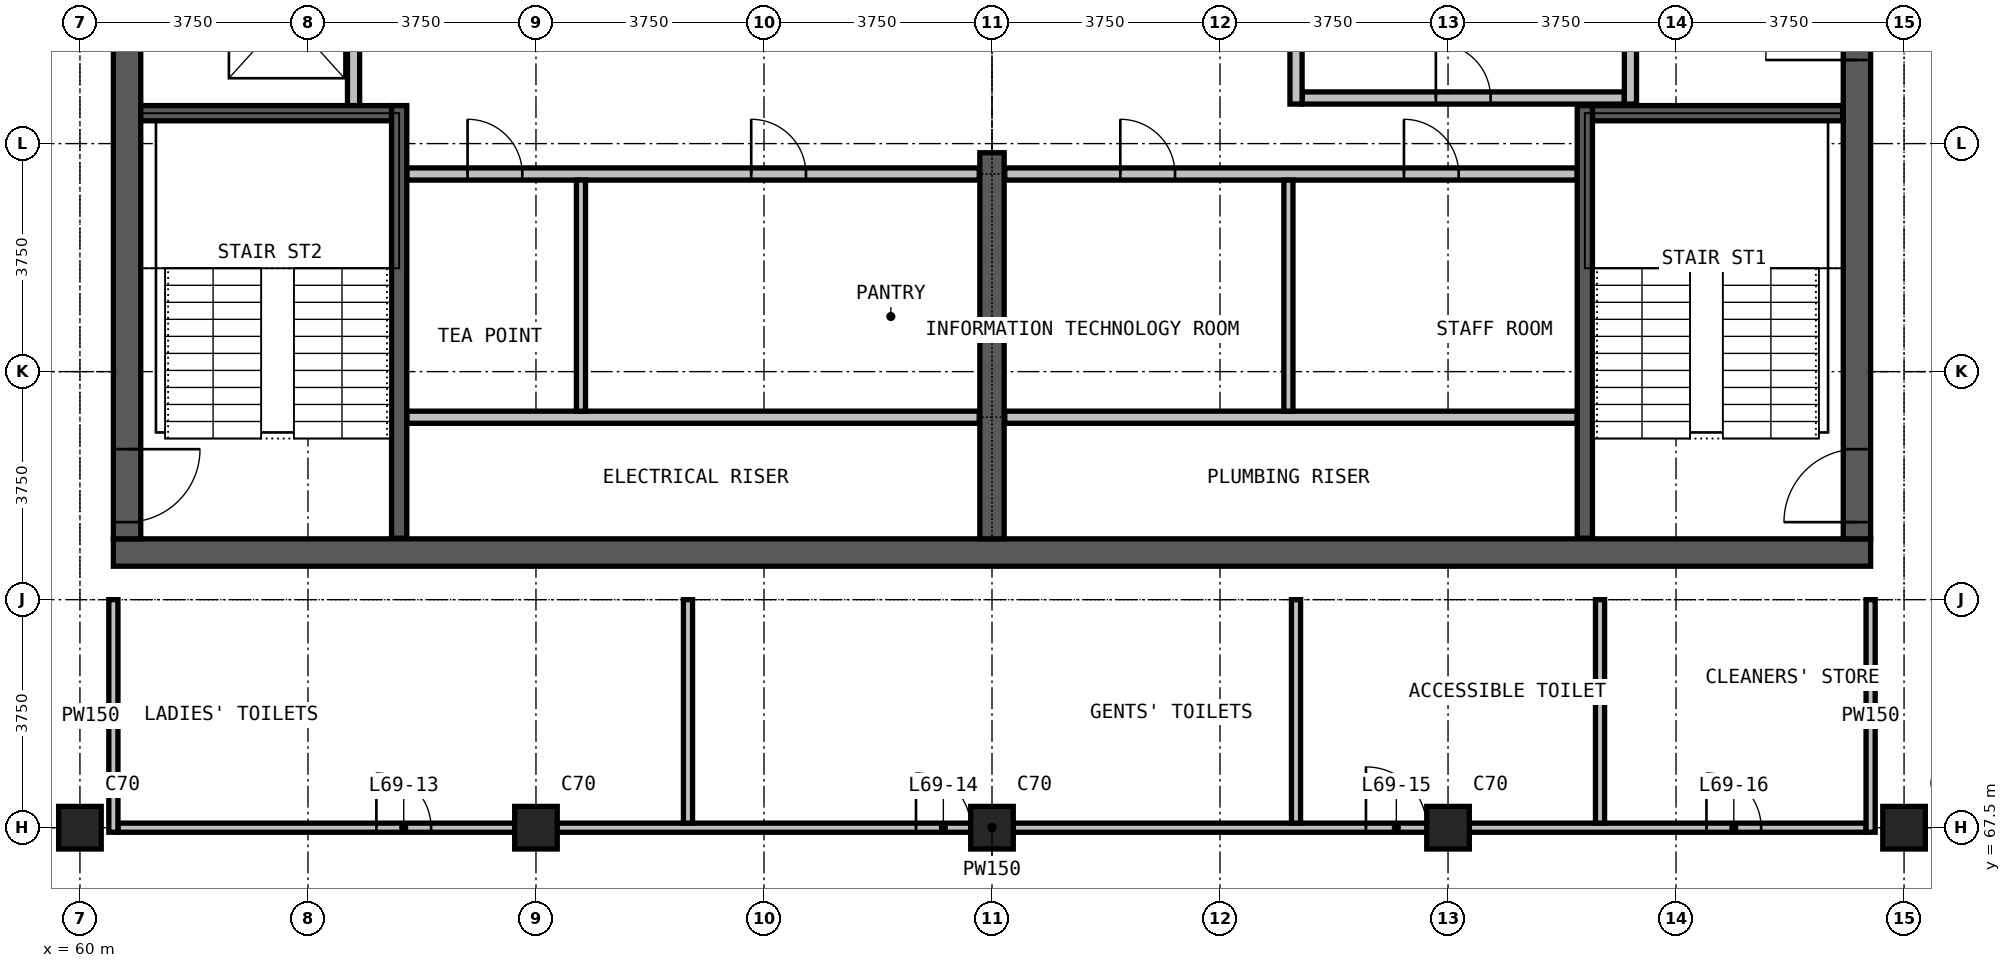
"""IFC4 building model, lengths in metres.
Left out: names, types, materials, properties, quantities, classifications, styles, units other than length and angle.
Written with IfcOpenShell. Run it as: python <this file> out.ifc"""

import sys

from ifc_helpers import new_model, si_unit, direction, frame, frame_2d, origin, origin_2d, place, context, subcontext, project, spatial, rectangle, extrude, element, fill, save


model = new_model("IFC4")
c1 = context("Model", 3, precision=1e-05, world=origin(), true_north=direction((0.0, 1.0)))
c2 = subcontext(c1, "Body", "Model", "MODEL_VIEW")
j1 = project(units=[si_unit("LENGTHUNIT", "METRE"), si_unit("PLANEANGLEUNIT", "RADIAN")], contexts=[c1])
p1 = place(None, origin())
s1 = spatial("IfcSite", under=j1, at=p1, CompositionType="ELEMENT")
p2 = place(p1, origin())
s2 = spatial("IfcBuilding", under=s1, at=p2, CompositionType="ELEMENT")
p3 = place(p2, frame((0.0, 0.0, 265.7)))
s3 = spatial("IfcBuildingStorey", under=s2, at=p3, CompositionType="ELEMENT", Elevation=265.7)
for number, where, z_axis, x_axis in (
    (1, (60.0, 67.5, 0.0), (0.0, 0.0, 1.0), (1.0, 0.0, 0.0)),
    (2, (67.5, 67.5, 0.0), (0.0, 0.0, 1.0), (1.0, 0.0, 0.0)),
    (3, (75.0, 67.5, 0.0), (0.0, 0.0, 1.0), (1.0, 0.0, 0.0)),
    (4, (82.5, 67.5, 0.0), (0.0, 0.0, 1.0), (1.0, 0.0, 0.0)),
    (5, (90.0, 67.5, 0.0), (0.0, 0.0, 1.0), (1.0, 0.0, 0.0)),
):
    element("IfcColumn", number, at=place(p3, frame(where, z_axis=z_axis, x_axis=x_axis)), inside=s3, PredefinedType="COLUMN", context=c2, shape_type="SweptSolid", body=[
        extrude(rectangle(XDim=0.7, YDim=0.7, at=origin_2d()), origin(), (0.0, 0.0, 1.0), 3.6),
    ])
p4 = place(p3, frame((60.55, 72.025, 0.0), z_axis=(0.0, 0.0, 1.0), x_axis=(1.0, 0.0, 0.0)))
e6 = element("IfcWall", 6, at=p4, inside=s3, PredefinedType="SHEAR", context=c2, shape_type="SweptSolid", body=[
    extrude(rectangle(XDim=28.9, YDim=0.45, at=frame_2d((14.45, 0.0))), origin(), (0.0, 0.0, 1.0), 3.6),
])
p5 = place(p3, frame((89.225, 72.25, 0.0), z_axis=(0.0, 0.0, 1.0), x_axis=(0.0, 1.0, 0.0)))
e7 = element("IfcWall", 7, at=p5, inside=s3, PredefinedType="SHEAR", context=c2, shape_type="SweptSolid", body=[
    extrude(rectangle(XDim=20.5, YDim=0.45, at=frame_2d((10.25, 0.0))), origin(), (0.0, 0.0, 1.0), 3.6),
])
p6 = place(p5, frame((0.275, 0.0, 0.0)))
e8 = element("IfcOpeningElement", 8, at=p6, cuts=e7, PredefinedType="OPENING", context=c2, shape_type="SweptSolid", body=[
    extrude(rectangle(XDim=1.2, YDim=2.2, at=frame_2d((0.6, 1.1))), frame((0.0, 0.235, 0.0), z_axis=(0.0, -1.0, 0.0), x_axis=(1.0, 0.0, 0.0)), (0.0, 0.0, 1.0), 0.47),
])
p7 = place(p5, frame((13.775, 0.0, 0.0)))
e9 = element("IfcOpeningElement", 9, at=p7, cuts=e7, PredefinedType="OPENING", context=c2, shape_type="SweptSolid", body=[
    extrude(rectangle(XDim=1.2, YDim=2.2, at=frame_2d((0.6, 1.1))), frame((0.0, 0.235, 0.0), z_axis=(0.0, -1.0, 0.0), x_axis=(1.0, 0.0, 0.0)), (0.0, 0.0, 1.0), 0.47),
])
p8 = place(p5, frame((7.875, 0.0, 0.0)))
e10 = element("IfcOpeningElement", 10, at=p8, cuts=e7, PredefinedType="OPENING", context=c2, shape_type="SweptSolid", body=[
    extrude(rectangle(XDim=1.5, YDim=2.2, at=frame_2d((0.75, 1.1))), frame((0.0, 0.235, 0.0), z_axis=(0.0, -1.0, 0.0), x_axis=(1.0, 0.0, 0.0)), (0.0, 0.0, 1.0), 0.47),
])
p9 = place(p3, frame((60.775, 92.75, 0.0), z_axis=(0.0, 0.0, 1.0), x_axis=(0.0, -1.0, 0.0)))
e11 = element("IfcWall", 11, at=p9, inside=s3, PredefinedType="SHEAR", context=c2, shape_type="SweptSolid", body=[
    extrude(rectangle(XDim=20.5, YDim=0.45, at=frame_2d((10.25, 0.0))), origin(), (0.0, 0.0, 1.0), 3.6),
])
p10 = place(p9, frame((19.025, 0.0, 0.0)))
e12 = element("IfcOpeningElement", 12, at=p10, cuts=e11, PredefinedType="OPENING", context=c2, shape_type="SweptSolid", body=[
    extrude(rectangle(XDim=1.2, YDim=2.2, at=frame_2d((0.6, 1.1))), frame((0.0, 0.235, 0.0), z_axis=(0.0, -1.0, 0.0), x_axis=(1.0, 0.0, 0.0)), (0.0, 0.0, 1.0), 0.47),
])
p11 = place(p9, frame((8.025, 0.0, 0.0)))
e13 = element("IfcOpeningElement", 13, at=p11, cuts=e11, PredefinedType="OPENING", context=c2, shape_type="SweptSolid", body=[
    extrude(rectangle(XDim=1.2, YDim=2.2, at=frame_2d((0.6, 1.1))), frame((0.0, 0.235, 0.0), z_axis=(0.0, -1.0, 0.0), x_axis=(1.0, 0.0, 0.0)), (0.0, 0.0, 1.0), 0.47),
])
p12 = place(p3, frame((75.0, 72.25, 0.0), z_axis=(0.0, 0.0, 1.0), x_axis=(0.0, 1.0, 0.0)))
e14 = element("IfcWall", 14, at=p12, inside=s3, PredefinedType="SHEAR", context=c2, shape_type="SweptSolid", body=[
    extrude(rectangle(XDim=6.35, YDim=0.4, at=frame_2d((3.175, 0.0))), origin(), (0.0, 0.0, 1.0), 3.6),
])
for number, where, z_axis, x_axis in (
    (15, (65.375, 74.25, 0.0), (0.0, 0.0, 1.0), (1.0, 0.0, 0.0)),
    (16, (75.21, 74.25, 0.0), (0.0, 0.0, 1.0), (1.0, 0.0, 0.0)),
):
    element("IfcWall", number, at=place(p3, frame(where, z_axis=z_axis, x_axis=x_axis)), inside=s3, PredefinedType="PARTITIONING", context=c2, shape_type="SweptSolid", body=[
        extrude(rectangle(XDim=9.415, YDim=0.2, at=frame_2d((4.708, 0.0))), origin(), (0.0, 0.0, 1.0), 3.3),
    ])
p13 = place(p3, frame((65.375, 78.25, 0.0), z_axis=(0.0, 0.0, 1.0), x_axis=(1.0, 0.0, 0.0)))
e17 = element("IfcWall", 17, at=p13, inside=s3, PredefinedType="PARTITIONING", context=c2, shape_type="SweptSolid", body=[
    extrude(rectangle(XDim=9.415, YDim=0.2, at=frame_2d((4.708, 0.0))), origin(), (0.0, 0.0, 1.0), 3.3),
])
p14 = place(p13, frame((1.0, 0.0, 0.0)))
e18 = element("IfcOpeningElement", 18, at=p14, cuts=e17, PredefinedType="OPENING", context=c2, shape_type="SweptSolid", body=[
    extrude(rectangle(XDim=0.9, YDim=2.2, at=frame_2d((0.45, 1.1))), frame((0.0, 0.11, 0.0), z_axis=(0.0, -1.0, 0.0), x_axis=(1.0, 0.0, 0.0)), (0.0, 0.0, 1.0), 0.22),
])
p15 = place(p13, frame((5.665, 0.0, 0.0)))
e19 = element("IfcOpeningElement", 19, at=p15, cuts=e17, PredefinedType="OPENING", context=c2, shape_type="SweptSolid", body=[
    extrude(rectangle(XDim=0.9, YDim=2.2, at=frame_2d((0.45, 1.1))), frame((0.0, 0.11, 0.0), z_axis=(0.0, -1.0, 0.0), x_axis=(1.0, 0.0, 0.0)), (0.0, 0.0, 1.0), 0.22),
])
p16 = place(p3, frame((75.21, 78.25, 0.0), z_axis=(0.0, 0.0, 1.0), x_axis=(1.0, 0.0, 0.0)))
e20 = element("IfcWall", 20, at=p16, inside=s3, PredefinedType="PARTITIONING", context=c2, shape_type="SweptSolid", body=[
    extrude(rectangle(XDim=9.415, YDim=0.2, at=frame_2d((4.708, 0.0))), origin(), (0.0, 0.0, 1.0), 3.3),
])
p17 = place(p16, frame((1.9, 0.0, 0.0)))
e21 = element("IfcOpeningElement", 21, at=p17, cuts=e20, PredefinedType="OPENING", context=c2, shape_type="SweptSolid", body=[
    extrude(rectangle(XDim=0.9, YDim=2.2, at=frame_2d((0.45, 1.1))), frame((0.0, 0.11, 0.0), z_axis=(0.0, -1.0, 0.0), x_axis=(1.0, 0.0, 0.0)), (0.0, 0.0, 1.0), 0.22),
])
p18 = place(p16, frame((6.565, 0.0, 0.0)))
e22 = element("IfcOpeningElement", 22, at=p18, cuts=e20, PredefinedType="OPENING", context=c2, shape_type="SweptSolid", body=[
    extrude(rectangle(XDim=0.9, YDim=2.2, at=frame_2d((0.45, 1.1))), frame((0.0, 0.11, 0.0), z_axis=(0.0, -1.0, 0.0), x_axis=(1.0, 0.0, 0.0)), (0.0, 0.0, 1.0), 0.22),
])
p19 = place(p3, frame((80.1, 79.5, 0.0), z_axis=(0.0, 0.0, 1.0), x_axis=(1.0, 0.0, 0.0)))
e23 = element("IfcWall", 23, at=p19, inside=s3, PredefinedType="PARTITIONING", context=c2, shape_type="SweptSolid", body=[
    extrude(rectangle(XDim=5.3, YDim=0.2, at=frame_2d((2.65, 0.0))), origin(), (0.0, 0.0, 1.0), 3.3),
])
p20 = place(p19, frame((2.2, 0.0, 0.0)))
e24 = element("IfcOpeningElement", 24, at=p20, cuts=e23, PredefinedType="OPENING", context=c2, shape_type="SweptSolid", body=[
    extrude(rectangle(XDim=0.9, YDim=2.2, at=frame_2d((0.45, 1.1))), frame((0.0, 0.11, 0.0), z_axis=(0.0, -1.0, 0.0), x_axis=(1.0, 0.0, 0.0)), (0.0, 0.0, 1.0), 0.22),
])
for number, where, z_axis, x_axis in (
    (25, (80.0, 79.4, 0.0), (0.0, 0.0, 1.0), (0.0, 1.0, 0.0)),
    (26, (85.5, 79.4, 0.0), (0.0, 0.0, 1.0), (0.0, 1.0, 0.0)),
):
    element("IfcWall", number, at=place(p3, frame(where, z_axis=z_axis, x_axis=x_axis)), inside=s3, PredefinedType="PARTITIONING", context=c2, shape_type="SweptSolid", body=[
        extrude(rectangle(XDim=2.89, YDim=0.2, at=frame_2d((1.445, 0.0))), origin(), (0.0, 0.0, 1.0), 3.3),
    ])
p21 = place(p3, frame((60.625, 67.5, 0.0), z_axis=(0.0, 0.0, 1.0), x_axis=(1.0, 0.0, 0.0)))
e27 = element("IfcWall", 27, at=p21, inside=s3, PredefinedType="PARTITIONING", context=c2, shape_type="SweptSolid", body=[
    extrude(rectangle(XDim=28.75, YDim=0.15, at=frame_2d((14.375, 0.0))), origin(), (0.0, 0.0, 1.0), 3.3),
])
p22 = place(p21, frame((4.25, 0.0, 0.0)))
e28 = element("IfcOpeningElement", 28, at=p22, cuts=e27, PredefinedType="OPENING", context=c2, shape_type="SweptSolid", body=[
    extrude(rectangle(XDim=0.9, YDim=2.2, at=frame_2d((0.45, 1.1))), frame((0.0, 0.085, 0.0), z_axis=(0.0, -1.0, 0.0), x_axis=(1.0, 0.0, 0.0)), (0.0, 0.0, 1.0), 0.17),
])
p23 = place(p21, frame((13.125, 0.0, 0.0)))
e29 = element("IfcOpeningElement", 29, at=p23, cuts=e27, PredefinedType="OPENING", context=c2, shape_type="SweptSolid", body=[
    extrude(rectangle(XDim=0.9, YDim=2.2, at=frame_2d((0.45, 1.1))), frame((0.0, 0.085, 0.0), z_axis=(0.0, -1.0, 0.0), x_axis=(1.0, 0.0, 0.0)), (0.0, 0.0, 1.0), 0.17),
])
p24 = place(p21, frame((20.525, 0.0, 0.0)))
e30 = element("IfcOpeningElement", 30, at=p24, cuts=e27, PredefinedType="OPENING", context=c2, shape_type="SweptSolid", body=[
    extrude(rectangle(XDim=1.0, YDim=2.2, at=frame_2d((0.5, 1.1))), frame((0.0, 0.085, 0.0), z_axis=(0.0, -1.0, 0.0), x_axis=(1.0, 0.0, 0.0)), (0.0, 0.0, 1.0), 0.17),
])
p25 = place(p21, frame((26.125, 0.0, 0.0)))
e31 = element("IfcOpeningElement", 31, at=p25, cuts=e27, PredefinedType="OPENING", context=c2, shape_type="SweptSolid", body=[
    extrude(rectangle(XDim=0.9, YDim=2.2, at=frame_2d((0.45, 1.1))), frame((0.0, 0.085, 0.0), z_axis=(0.0, -1.0, 0.0), x_axis=(1.0, 0.0, 0.0)), (0.0, 0.0, 1.0), 0.17),
])
p26 = place(p3, frame((60.55, 67.425, 0.0), z_axis=(0.0, 0.0, 1.0), x_axis=(0.0, 1.0, 0.0)))
e32 = element("IfcWall", 32, at=p26, inside=s3, PredefinedType="PARTITIONING", context=c2, shape_type="SweptSolid", body=[
    extrude(rectangle(XDim=3.825, YDim=0.15, at=frame_2d((1.913, 0.0))), origin(), (0.0, 0.0, 1.0), 3.3),
])
p27 = place(p3, frame((68.24, 74.35, 0.0), z_axis=(0.0, 0.0, 1.0), x_axis=(0.0, 1.0, 0.0)))
e33 = element("IfcWall", 33, at=p27, inside=s3, PredefinedType="PARTITIONING", context=c2, shape_type="SweptSolid", body=[
    extrude(rectangle(XDim=3.8, YDim=0.15, at=frame_2d((1.9, 0.0))), origin(), (0.0, 0.0, 1.0), 3.3),
])
p28 = place(p3, frame((70.0, 67.575, 0.0), z_axis=(0.0, 0.0, 1.0), x_axis=(0.0, 1.0, 0.0)))
e34 = element("IfcWall", 34, at=p28, inside=s3, PredefinedType="PARTITIONING", context=c2, shape_type="SweptSolid", body=[
    extrude(rectangle(XDim=3.675, YDim=0.15, at=frame_2d((1.837, 0.0))), origin(), (0.0, 0.0, 1.0), 3.3),
])
p29 = place(p3, frame((79.875, 74.35, 0.0), z_axis=(0.0, 0.0, 1.0), x_axis=(0.0, 1.0, 0.0)))
e35 = element("IfcWall", 35, at=p29, inside=s3, PredefinedType="PARTITIONING", context=c2, shape_type="SweptSolid", body=[
    extrude(rectangle(XDim=3.8, YDim=0.15, at=frame_2d((1.9, 0.0))), origin(), (0.0, 0.0, 1.0), 3.3),
])
for number, where, z_axis, x_axis in (
    (36, (80.0, 67.575, 0.0), (0.0, 0.0, 1.0), (0.0, 1.0, 0.0)),
    (37, (85.0, 67.575, 0.0), (0.0, 0.0, 1.0), (0.0, 1.0, 0.0)),
):
    element("IfcWall", number, at=place(p3, frame(where, z_axis=z_axis, x_axis=x_axis)), inside=s3, PredefinedType="PARTITIONING", context=c2, shape_type="SweptSolid", body=[
        extrude(rectangle(XDim=3.675, YDim=0.15, at=frame_2d((1.837, 0.0))), origin(), (0.0, 0.0, 1.0), 3.3),
    ])
p30 = place(p3, frame((89.45, 67.425, 0.0), z_axis=(0.0, 0.0, 1.0), x_axis=(0.0, 1.0, 0.0)))
e38 = element("IfcWall", 38, at=p30, inside=s3, PredefinedType="PARTITIONING", context=c2, shape_type="SweptSolid", body=[
    extrude(rectangle(XDim=3.825, YDim=0.15, at=frame_2d((1.913, 0.0))), origin(), (0.0, 0.0, 1.0), 3.3),
])
p31 = place(p3, frame((64.5, 79.375, 0.0), z_axis=(0.0, 0.0, 1.0), x_axis=(0.0, 1.0, 0.0)))
e39 = element("IfcWall", 39, at=p31, inside=s3, PredefinedType="PARTITIONING", context=c2, shape_type="SweptSolid", body=[
    extrude(rectangle(XDim=2.915, YDim=0.2, at=frame_2d((1.458, 0.0))), origin(), (0.0, 0.0, 1.0), 3.3),
])
p32 = place(p3, frame((61.0, 79.25, 0.0), z_axis=(0.0, 0.0, 1.0), x_axis=(1.0, 0.0, 0.0)))
e40 = element("IfcWall", 40, at=p32, inside=s3, PredefinedType="PARTITIONING", context=c2, shape_type="SweptSolid", body=[
    extrude(rectangle(XDim=4.125, YDim=0.25, at=frame_2d((2.062, 0.0))), origin(), (0.0, 0.0, 1.0), 3.3),
])
p33 = place(p3, frame((84.875, 79.25, 0.0), z_axis=(0.0, 0.0, 1.0), x_axis=(1.0, 0.0, 0.0)))
e41 = element("IfcWall", 41, at=p33, inside=s3, PredefinedType="PARTITIONING", context=c2, shape_type="SweptSolid", body=[
    extrude(rectangle(XDim=4.115, YDim=0.25, at=frame_2d((2.058, 0.0))), origin(), (0.0, 0.0, 1.0), 3.3),
])
for number, where, z_axis, x_axis in (
    (42, (65.25, 72.26, 0.0), (0.0, 0.0, 1.0), (0.0, 1.0, 0.0)),
    (43, (84.75, 72.26, 0.0), (0.0, 0.0, 1.0), (0.0, 1.0, 0.0)),
):
    element("IfcWall", number, at=place(p3, frame(where, z_axis=z_axis, x_axis=x_axis)), inside=s3, PredefinedType="PARTITIONING", context=c2, shape_type="SweptSolid", body=[
        extrude(rectangle(XDim=7.115, YDim=0.25, at=frame_2d((3.558, 0.0))), origin(), (0.0, 0.0, 1.0), 3.3),
    ])
p34 = place(p6, origin())
e44 = element("IfcDoor", 44, at=p34, inside=s3, OperationType="SINGLE_SWING_RIGHT", PredefinedType="DOOR", context=c2, shape_type="SweptSolid", body=[
    extrude(rectangle(XDim=1.2, YDim=2.2, at=frame_2d((0.6, 1.1))), frame((0.0, 0.025, 0.0), z_axis=(0.0, -1.0, 0.0), x_axis=(1.0, 0.0, 0.0)), (0.0, 0.0, 1.0), 0.05),
])
fill(e8, e44)
p35 = place(p10, origin())
e45 = element("IfcDoor", 45, at=p35, inside=s3, OperationType="SINGLE_SWING_LEFT", PredefinedType="DOOR", context=c2, shape_type="SweptSolid", body=[
    extrude(rectangle(XDim=1.2, YDim=2.2, at=frame_2d((0.6, 1.1))), frame((0.0, 0.025, 0.0), z_axis=(0.0, -1.0, 0.0), x_axis=(1.0, 0.0, 0.0)), (0.0, 0.0, 1.0), 0.05),
])
fill(e12, e45)
p36 = place(p8, origin())
e46 = element("IfcDoor", 46, at=p36, inside=s3, OperationType="DOUBLE_DOOR_SINGLE_SWING", PredefinedType="DOOR", context=c2, shape_type="SweptSolid", body=[
    extrude(rectangle(XDim=1.5, YDim=2.2, at=frame_2d((0.75, 1.1))), frame((0.0, 0.025, 0.0), z_axis=(0.0, -1.0, 0.0), x_axis=(1.0, 0.0, 0.0)), (0.0, 0.0, 1.0), 0.05),
])
fill(e10, e46)
p37 = place(p20, origin())
e47 = element("IfcDoor", 47, at=p37, inside=s3, OperationType="SINGLE_SWING_RIGHT", PredefinedType="DOOR", context=c2, shape_type="SweptSolid", body=[
    extrude(rectangle(XDim=0.9, YDim=2.2, at=frame_2d((0.45, 1.1))), frame((0.0, 0.025, 0.0), z_axis=(0.0, -1.0, 0.0), x_axis=(1.0, 0.0, 0.0)), (0.0, 0.0, 1.0), 0.05),
])
fill(e24, e47)
p38 = place(p14, origin())
e48 = element("IfcDoor", 48, at=p38, inside=s3, OperationType="SINGLE_SWING_LEFT", PredefinedType="DOOR", context=c2, shape_type="SweptSolid", body=[
    extrude(rectangle(XDim=0.9, YDim=2.2, at=frame_2d((0.45, 1.1))), frame((0.0, 0.025, 0.0), z_axis=(0.0, -1.0, 0.0), x_axis=(1.0, 0.0, 0.0)), (0.0, 0.0, 1.0), 0.05),
])
fill(e18, e48)
p39 = place(p15, origin())
e49 = element("IfcDoor", 49, at=p39, inside=s3, OperationType="SINGLE_SWING_LEFT", PredefinedType="DOOR", context=c2, shape_type="SweptSolid", body=[
    extrude(rectangle(XDim=0.9, YDim=2.2, at=frame_2d((0.45, 1.1))), frame((0.0, 0.025, 0.0), z_axis=(0.0, -1.0, 0.0), x_axis=(1.0, 0.0, 0.0)), (0.0, 0.0, 1.0), 0.05),
])
fill(e19, e49)
p40 = place(p17, origin())
e50 = element("IfcDoor", 50, at=p40, inside=s3, OperationType="SINGLE_SWING_LEFT", PredefinedType="DOOR", context=c2, shape_type="SweptSolid", body=[
    extrude(rectangle(XDim=0.9, YDim=2.2, at=frame_2d((0.45, 1.1))), frame((0.0, 0.025, 0.0), z_axis=(0.0, -1.0, 0.0), x_axis=(1.0, 0.0, 0.0)), (0.0, 0.0, 1.0), 0.05),
])
fill(e21, e50)
p41 = place(p18, origin())
e51 = element("IfcDoor", 51, at=p41, inside=s3, OperationType="SINGLE_SWING_LEFT", PredefinedType="DOOR", context=c2, shape_type="SweptSolid", body=[
    extrude(rectangle(XDim=0.9, YDim=2.2, at=frame_2d((0.45, 1.1))), frame((0.0, 0.025, 0.0), z_axis=(0.0, -1.0, 0.0), x_axis=(1.0, 0.0, 0.0)), (0.0, 0.0, 1.0), 0.05),
])
fill(e22, e51)
p42 = place(p22, origin())
e52 = element("IfcDoor", 52, at=p42, inside=s3, OperationType="SINGLE_SWING_LEFT", PredefinedType="DOOR", context=c2, shape_type="SweptSolid", body=[
    extrude(rectangle(XDim=0.9, YDim=2.2, at=frame_2d((0.45, 1.1))), frame((0.0, 0.025, 0.0), z_axis=(0.0, -1.0, 0.0), x_axis=(1.0, 0.0, 0.0)), (0.0, 0.0, 1.0), 0.05),
])
fill(e28, e52)
p43 = place(p23, origin())
e53 = element("IfcDoor", 53, at=p43, inside=s3, OperationType="SINGLE_SWING_LEFT", PredefinedType="DOOR", context=c2, shape_type="SweptSolid", body=[
    extrude(rectangle(XDim=0.9, YDim=2.2, at=frame_2d((0.45, 1.1))), frame((0.0, 0.025, 0.0), z_axis=(0.0, -1.0, 0.0), x_axis=(1.0, 0.0, 0.0)), (0.0, 0.0, 1.0), 0.05),
])
fill(e29, e53)
p44 = place(p24, origin())
e54 = element("IfcDoor", 54, at=p44, inside=s3, OperationType="SINGLE_SWING_LEFT", PredefinedType="DOOR", context=c2, shape_type="SweptSolid", body=[
    extrude(rectangle(XDim=1.0, YDim=2.2, at=frame_2d((0.5, 1.1))), frame((0.0, 0.025, 0.0), z_axis=(0.0, -1.0, 0.0), x_axis=(1.0, 0.0, 0.0)), (0.0, 0.0, 1.0), 0.05),
])
fill(e30, e54)
p45 = place(p25, origin())
e55 = element("IfcDoor", 55, at=p45, inside=s3, OperationType="SINGLE_SWING_LEFT", PredefinedType="DOOR", context=c2, shape_type="SweptSolid", body=[
    extrude(rectangle(XDim=0.9, YDim=2.2, at=frame_2d((0.45, 1.1))), frame((0.0, 0.025, 0.0), z_axis=(0.0, -1.0, 0.0), x_axis=(1.0, 0.0, 0.0)), (0.0, 0.0, 1.0), 0.05),
])
fill(e31, e55)
save(model, sys.argv[1])
